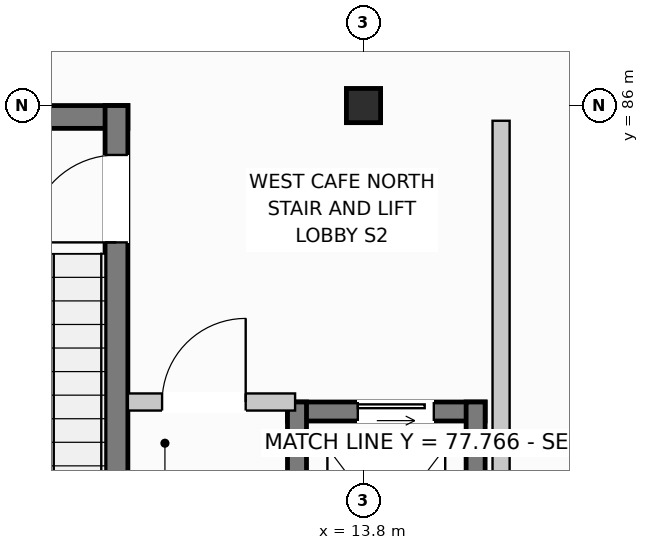
"""IFC4 building model, lengths in metres.
Left out: names, types, materials, properties, quantities, classifications, styles, units other than length and angle.
Written with IfcOpenShell. Run it as: python <this file> out.ifc"""

import sys

from ifc_helpers import new_model, si_unit, direction, frame, frame_2d, origin, origin_with_axes, origin_2d, place, context, subcontext, project, spatial, rectangle, extrude, element, fill, save


model = new_model("IFC4")
c1 = context("Model", 3, precision=1e-05, world=origin(), true_north=direction((0.0, 1.0)))
c2 = subcontext(c1, "Body", "Model", "MODEL_VIEW")
j1 = project(units=[si_unit("LENGTHUNIT", "METRE"), si_unit("PLANEANGLEUNIT", "RADIAN")], contexts=[c1])
p1 = place(None, origin())
s1 = spatial("IfcSite", under=j1, at=p1, CompositionType="ELEMENT")
p2 = place(p1, origin())
s2 = spatial("IfcBuilding", under=s1, at=p2, CompositionType="ELEMENT")
p3 = place(p2, frame((0.0, 0.0, -3.8)))
s3 = spatial("IfcBuildingStorey", under=s2, at=p3, CompositionType="ELEMENT", Elevation=-3.8)
p4 = place(p3, frame((13.8, 86.0, 0.0), z_axis=(0.0, 0.0, 1.0), x_axis=(1.0, 0.0, 0.0)))
e1 = element("IfcColumn", 1, at=p4, inside=s3, PredefinedType="COLUMN", context=c2, shape_type="SweptSolid", body=[
    extrude(rectangle(XDim=0.45, YDim=0.45, at=origin_2d()), origin(), (0.0, 0.0, 1.0), 3.8),
])
p5 = place(p3, frame((7.2, 85.85, 0.0), z_axis=(0.0, 0.0, 1.0), x_axis=(1.0, 0.0, 0.0)))
e2 = element("IfcWall", 2, at=p5, inside=s3, PredefinedType="SHEAR", context=c2, shape_type="SweptSolid", body=[
    extrude(rectangle(XDim=3.5, YDim=0.3, at=frame_2d((1.75, 0.0))), origin(), (0.0, 0.0, 1.0), 3.48),
])
p6 = place(p3, frame((10.55, 78.5, 0.0), z_axis=(0.0, 0.0, 1.0), x_axis=(0.0, 1.0, 0.0)))
e3 = element("IfcWall", 3, at=p6, inside=s3, PredefinedType="SHEAR", context=c2, shape_type="SweptSolid", body=[
    extrude(rectangle(XDim=7.5, YDim=0.3, at=frame_2d((3.75, 0.0))), origin(), (0.0, 0.0, 1.0), 3.48),
])
p7 = place(p6, frame((5.7, 0.0, 0.0)))
e4 = element("IfcOpeningElement", 4, at=p7, cuts=e3, PredefinedType="OPENING", context=c2, shape_type="SweptSolid", body=[
    extrude(rectangle(XDim=1.15, YDim=2.15, at=frame_2d((0.575, 1.075))), frame((0.0, 0.162, 0.0), z_axis=(0.0, -1.0, 0.0), x_axis=(1.0, 0.0, 0.0)), (0.0, 0.0, 1.0), 0.324),
])
p8 = place(p3, frame((12.8, 81.975, 0.0), z_axis=(0.0, 0.0, 1.0), x_axis=(1.0, 0.0, 0.0)))
e5 = element("IfcWall", 5, at=p8, inside=s3, PredefinedType="SHEAR", context=c2, shape_type="SweptSolid", body=[
    extrude(rectangle(XDim=2.6, YDim=0.25, at=frame_2d((1.3, 0.0))), origin(), (0.0, 0.0, 1.0), 3.48),
])
p9 = place(p8, frame((0.925, 0.0, 0.0)))
e6 = element("IfcOpeningElement", 6, at=p9, cuts=e5, PredefinedType="OPENING", context=c2, shape_type="SweptSolid", body=[
    extrude(rectangle(XDim=1.0, YDim=2.1, at=frame_2d((0.5, 1.05))), frame((0.0, 0.137, 0.0), z_axis=(0.0, -1.0, 0.0), x_axis=(1.0, 0.0, 0.0)), (0.0, 0.0, 1.0), 0.274),
])
for number, where, z_axis, x_axis in (
    (7, (12.925, 78.85, 0.0), (0.0, 0.0, 1.0), (0.0, 1.0, 0.0)),
    (8, (15.275, 78.85, 0.0), (0.0, 0.0, 1.0), (0.0, 1.0, 0.0)),
):
    element("IfcWall", number, at=place(p3, frame(where, z_axis=z_axis, x_axis=x_axis)), inside=s3, PredefinedType="SHEAR", context=c2, shape_type="SweptSolid", body=[
        extrude(rectangle(XDim=3.25, YDim=0.25, at=frame_2d((1.625, 0.0))), origin(), (0.0, 0.0, 1.0), 3.48),
    ])
p10 = place(p3, frame((15.61, 78.2, 0.0), z_axis=(0.0, 0.0, 1.0), x_axis=(0.0, 1.0, 0.0)))
e9 = element("IfcWall", 9, at=p10, inside=s3, PredefinedType="PARTITIONING", context=c2, shape_type="SweptSolid", body=[
    extrude(rectangle(XDim=7.6, YDim=0.225, at=frame_2d((3.8, 0.0))), origin(), (0.0, 0.0, 1.0), 3.48),
])
p11 = place(p3, frame((10.7, 82.1, 0.0), z_axis=(0.0, 0.0, 1.0), x_axis=(1.0, 0.0, 0.0)))
e10 = element("IfcWall", 10, at=p11, inside=s3, PredefinedType="PARTITIONING", context=c2, shape_type="SweptSolid", body=[
    extrude(rectangle(XDim=2.2, YDim=0.225, at=frame_2d((1.1, 0.0))), origin(), (0.0, 0.0, 1.0), 3.48),
])
p12 = place(p11, frame((0.45, 0.0, 0.0)))
e11 = element("IfcOpeningElement", 11, at=p12, cuts=e10, PredefinedType="OPENING", context=c2, shape_type="SweptSolid", body=[
    extrude(rectangle(XDim=1.1, YDim=2.15, at=frame_2d((0.55, 1.075))), frame((0.0, 0.125, 0.0), z_axis=(0.0, -1.0, 0.0), x_axis=(1.0, 0.0, 0.0)), (0.0, 0.0, 1.0), 0.249),
])
p13 = place(p7, origin_with_axes())
e12 = element("IfcDoor", 12, at=p13, inside=s3, OperationType="SINGLE_SWING_LEFT", PredefinedType="DOOR", context=c2, shape_type="SweptSolid", body=[
    extrude(rectangle(XDim=1.15, YDim=2.15, at=frame_2d((0.575, 1.075))), frame((0.0, 0.025, 0.0), z_axis=(0.0, -1.0, 0.0), x_axis=(1.0, 0.0, 0.0)), (0.0, 0.0, 1.0), 0.05),
])
fill(e4, e12)
p14 = place(p9, origin_with_axes())
e13 = element("IfcDoor", 13, at=p14, inside=s3, OperationType="SLIDING_TO_LEFT", PredefinedType="DOOR", context=c2, shape_type="SweptSolid", body=[
    extrude(rectangle(XDim=1.0, YDim=2.1, at=frame_2d((0.5, 1.05))), frame((0.0, 0.025, 0.0), z_axis=(0.0, -1.0, 0.0), x_axis=(1.0, 0.0, 0.0)), (0.0, 0.0, 1.0), 0.05),
])
fill(e6, e13)
p15 = place(p12, origin_with_axes())
e14 = element("IfcDoor", 14, at=p15, inside=s3, OperationType="SINGLE_SWING_RIGHT", PredefinedType="DOOR", context=c2, shape_type="SweptSolid", body=[
    extrude(rectangle(XDim=1.1, YDim=2.15, at=frame_2d((0.55, 1.075))), frame((0.0, 0.025, 0.0), z_axis=(0.0, -1.0, 0.0), x_axis=(1.0, 0.0, 0.0)), (0.0, 0.0, 1.0), 0.05),
])
fill(e11, e14)
save(model, sys.argv[1])
